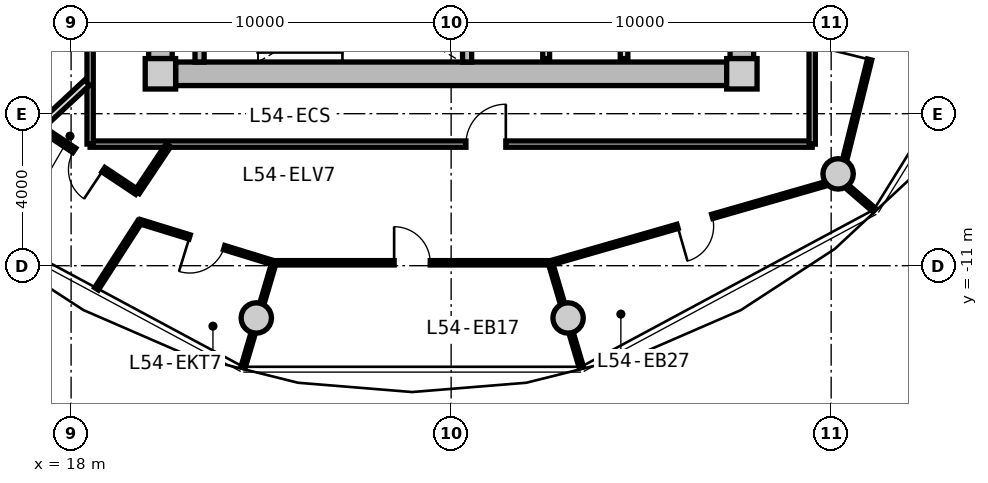
"""IFC4 building model, lengths in metres.
Left out: names, types, materials, properties, quantities, classifications, styles, units other than length and angle.
Written with IfcOpenShell. Run it as: python <this file> out.ifc"""

import sys

from ifc_helpers import new_model, si_unit, direction, frame, frame_2d, origin, origin_2d, place, context, subcontext, project, spatial, rectangle, circle, extrude, source, transform, mapped, element, fill, save


model = new_model("IFC4")
c1 = context("Model", 3, precision=1e-05, world=origin(), true_north=direction((0.0, 1.0)))
c2 = subcontext(c1, "Body", "Model", "MODEL_VIEW")
j1 = project(units=[si_unit("LENGTHUNIT", "METRE"), si_unit("PLANEANGLEUNIT", "RADIAN")], contexts=[c1])
p1 = place(None, origin())
s1 = spatial("IfcSite", under=j1, at=p1, CompositionType="ELEMENT")
p2 = place(p1, origin())
s2 = spatial("IfcBuilding", under=s1, at=p2, CompositionType="ELEMENT")
p3 = place(p2, frame((0.0, 0.0, 173.95)))
s3 = spatial("IfcBuildingStorey", under=s2, at=p3, CompositionType="ELEMENT", Elevation=173.95)
m1 = source(origin(), c2, "Body", "SweptSolid", [
    extrude(rectangle(XDim=0.8, YDim=0.8, at=origin_2d()), origin(), (0.0, 0.0, 1.0), 3.05),
])
for number, where, z_axis, x_axis in (
    (1, (20.35, -5.95, 0.0), (0.0, 0.0, 1.0), (1.0, 0.0, 0.0)),
    (2, (35.65, -5.95, 0.0), (0.0, 0.0, 1.0), (1.0, 0.0, 0.0)),
):
    element("IfcColumn", number, at=place(p3, frame(where, z_axis=z_axis, x_axis=x_axis)), inside=s3, PredefinedType="COLUMN", context=c2, shape_type="MappedRepresentation", body=[
        mapped(m1, transform((0.0, 0.0, 0.0), x_axis=(1.0, 0.0, 0.0), y_axis=(0.0, 1.0, 0.0), z_axis=(0.0, 0.0, 1.0), scale=1.0)),
    ])
m2 = source(origin(), c2, "Body", "SweptSolid", [
    extrude(rectangle(XDim=14.5, YDim=0.62, at=frame_2d((7.25, 0.0))), origin(), (0.0, 0.0, 1.0), 2.81),
])
p4 = place(p3, frame((35.25, -5.95, 0.0), z_axis=(0.0, 0.0, 1.0), x_axis=(-1.0, 0.0, 0.0)))
e3 = element("IfcWall", 3, at=p4, inside=s3, PredefinedType="SHEAR", context=c2, shape_type="MappedRepresentation", body=[
    mapped(m2, transform((0.0, 0.0, 0.0), x_axis=(1.0, 0.0, 0.0), y_axis=(0.0, 1.0, 0.0), z_axis=(0.0, 0.0, 1.0), scale=1.0)),
])
m3 = source(origin(), c2, "Body", "SweptSolid", [
    extrude(rectangle(XDim=11.1, YDim=0.62, at=frame_2d((5.55, 0.0))), origin(), (0.0, 0.0, 1.0), 2.81),
])
p5 = place(p3, frame((20.35, -5.55, 0.0), z_axis=(0.0, 0.0, 1.0), x_axis=(0.0, 1.0, 0.0)))
e4 = element("IfcWall", 4, at=p5, inside=s3, PredefinedType="SHEAR", context=c2, shape_type="MappedRepresentation", body=[
    mapped(m3, transform((0.0, 0.0, 0.0), x_axis=(1.0, 0.0, 0.0), y_axis=(0.0, 1.0, 0.0), z_axis=(0.0, 0.0, 1.0), scale=1.0)),
])
p6 = place(p5, frame((3.8, 0.0, 0.0)))
e5 = element("IfcOpeningElement", 5, at=p6, cuts=e4, PredefinedType="OPENING", context=c2, shape_type="SweptSolid", body=[
    extrude(rectangle(XDim=1.2, YDim=2.15, at=frame_2d((0.6, 1.075))), frame((0.0, 0.32, 0.0), z_axis=(0.0, -1.0, 0.0), x_axis=(1.0, 0.0, 0.0)), (0.0, 0.0, 1.0), 0.64),
])
p7 = place(p3, frame((35.65, 5.55, 0.0), z_axis=(0.0, 0.0, 1.0), x_axis=(0.0, -1.0, 0.0)))
e6 = element("IfcWall", 6, at=p7, inside=s3, PredefinedType="SHEAR", context=c2, shape_type="MappedRepresentation", body=[
    mapped(m3, transform((0.0, 0.0, 0.0), x_axis=(1.0, 0.0, 0.0), y_axis=(0.0, 1.0, 0.0), z_axis=(0.0, 0.0, 1.0), scale=1.0)),
])
p8 = place(p7, frame((5.65, 0.0, 0.0)))
e7 = element("IfcOpeningElement", 7, at=p8, cuts=e6, PredefinedType="OPENING", context=c2, shape_type="SweptSolid", body=[
    extrude(rectangle(XDim=1.2, YDim=2.15, at=frame_2d((0.6, 1.075))), frame((0.0, 0.32, 0.0), z_axis=(0.0, -1.0, 0.0), x_axis=(1.0, 0.0, 0.0)), (0.0, 0.0, 1.0), 0.64),
])
m4 = source(origin(), c2, "Body", "SweptSolid", [
    extrude(circle(Radius=0.4, at=origin_2d()), origin(), (0.0, 0.0, 1.0), 3.05),
])
for number, where, z_axis, x_axis in (
    (8, (22.873, -12.375, 0.0), (0.0, 0.0, 1.0), (1.0, 0.0, 0.0)),
    (9, (31.077, -12.375, 0.0), (0.0, 0.0, 1.0), (1.0, 0.0, 0.0)),
    (10, (38.183, -8.584, 0.0), (0.0, 0.0, 1.0), (1.0, 0.0, 0.0)),
):
    element("IfcColumn", number, at=place(p3, frame(where, z_axis=z_axis, x_axis=x_axis)), inside=s3, PredefinedType="COLUMN", context=c2, shape_type="MappedRepresentation", body=[
        mapped(m4, transform((0.0, 0.0, 0.0), x_axis=(1.0, 0.0, 0.0), y_axis=(0.0, 1.0, 0.0), z_axis=(0.0, 0.0, 1.0), scale=1.0)),
    ])
m5 = source(origin(), c2, "Body", "SweptSolid", [
    extrude(rectangle(XDim=3.19, YDim=0.24, at=frame_2d((1.595, 0.0))), origin(), (0.0, 0.0, 1.0), 2.81),
])
for number, where, z_axis, x_axis in (
    (11, (21.38, -5.64, 0.0), (0.0, 0.0, 1.0), (0.0, 1.0, 0.0)),
    (12, (28.42, -5.64, 0.0), (0.0, 0.0, 1.0), (0.0, 1.0, 0.0)),
):
    element("IfcWall", number, at=place(p3, frame(where, z_axis=z_axis, x_axis=x_axis)), inside=s3, PredefinedType="PARTITIONING", context=c2, shape_type="MappedRepresentation", body=[
        mapped(m5, transform((0.0, 0.0, 0.0), x_axis=(1.0, 0.0, 0.0), y_axis=(0.0, 1.0, 0.0), z_axis=(0.0, 0.0, 1.0), scale=1.0)),
    ])
m6 = source(origin(), c2, "Body", "SweptSolid", [
    extrude(rectangle(XDim=3.8, YDim=0.2, at=frame_2d((1.9, 0.0))), origin(), (0.0, 0.0, 1.0), 2.795),
])
p9 = place(p3, frame((32.55, -5.55, 0.0), z_axis=(0.0, 0.0, 1.0), x_axis=(0.0, 1.0, 0.0)))
e13 = element("IfcWall", 13, at=p9, inside=s3, PredefinedType="PARTITIONING", context=c2, shape_type="MappedRepresentation", body=[
    mapped(m6, transform((0.0, 0.0, 0.0), x_axis=(1.0, 0.0, 0.0), y_axis=(0.0, 1.0, 0.0), z_axis=(0.0, 0.0, 1.0), scale=1.0)),
])
m7 = source(origin(), c2, "Body", "SweptSolid", [
    extrude(rectangle(XDim=4.2, YDim=0.18, at=frame_2d((2.1, 0.0))), origin(), (0.0, 0.0, 1.0), 2.795),
])
p10 = place(p3, frame((30.5, -5.55, 0.0), z_axis=(0.0, 0.0, 1.0), x_axis=(0.0, 1.0, 0.0)))
e14 = element("IfcWall", 14, at=p10, inside=s3, PredefinedType="PARTITIONING", context=c2, shape_type="MappedRepresentation", body=[
    mapped(m7, transform((0.0, 0.0, 0.0), x_axis=(1.0, 0.0, 0.0), y_axis=(0.0, 1.0, 0.0), z_axis=(0.0, 0.0, 1.0), scale=1.0)),
])
m8 = source(origin(), c2, "Body", "SweptSolid", [
    extrude(rectangle(XDim=19.0, YDim=0.165, at=frame_2d((9.5, 0.0))), origin(), (0.0, 0.0, 1.0), 2.795),
])
p11 = place(p3, frame((37.5, -7.8, 0.0), z_axis=(0.0, 0.0, 1.0), x_axis=(-1.0, 0.0, 0.0)))
e15 = element("IfcWall", 15, at=p11, inside=s3, PredefinedType="PARTITIONING", context=c2, shape_type="MappedRepresentation", body=[
    mapped(m8, transform((0.0, 0.0, 0.0), x_axis=(1.0, 0.0, 0.0), y_axis=(0.0, 1.0, 0.0), z_axis=(0.0, 0.0, 1.0), scale=1.0)),
])
p12 = place(p11, frame((8.061, 0.0, 0.0)))
e16 = element("IfcOpeningElement", 16, at=p12, cuts=e15, PredefinedType="OPENING", context=c2, shape_type="SweptSolid", body=[
    extrude(rectangle(XDim=1.05, YDim=2.15, at=frame_2d((0.525, 1.075))), frame((0.0, 0.093, 0.0), z_axis=(0.0, -1.0, 0.0), x_axis=(1.0, 0.0, 0.0)), (0.0, 0.0, 1.0), 0.185),
])
m9 = source(origin(), c2, "Body", "SweptSolid", [
    extrude(rectangle(XDim=7.365, YDim=0.165, at=frame_2d((3.682, 0.0))), origin(), (0.0, 0.0, 1.0), 2.795),
])
p13 = place(p3, frame((18.5, -7.8, 0.0), z_axis=(0.0, 0.0, 1.0), x_axis=(0.0, 1.0, 0.0)))
e17 = element("IfcWall", 17, at=p13, inside=s3, PredefinedType="PARTITIONING", context=c2, shape_type="MappedRepresentation", body=[
    mapped(m9, transform((0.0, 0.0, 0.0), x_axis=(1.0, 0.0, 0.0), y_axis=(0.0, 1.0, 0.0), z_axis=(0.0, 0.0, 1.0), scale=1.0)),
])
p14 = place(p13, frame((2.854, 0.0, 0.0)))
e18 = element("IfcOpeningElement", 18, at=p14, cuts=e17, PredefinedType="OPENING", context=c2, shape_type="SweptSolid", body=[
    extrude(rectangle(XDim=1.05, YDim=2.15, at=frame_2d((0.525, 1.075))), frame((0.0, 0.093, 0.0), z_axis=(0.0, -1.0, 0.0), x_axis=(1.0, 0.0, 0.0)), (0.0, 0.0, 1.0), 0.185),
])
m10 = source(origin(), c2, "Body", "SweptSolid", [
    extrude(rectangle(XDim=6.88, YDim=0.165, at=frame_2d((3.44, 0.0))), origin(), (0.0, 0.0, 1.0), 2.795),
])
p15 = place(p3, frame((37.5, -0.92, 0.0), z_axis=(0.0, 0.0, 1.0), x_axis=(0.0, -1.0, 0.0)))
e19 = element("IfcWall", 19, at=p15, inside=s3, PredefinedType="PARTITIONING", context=c2, shape_type="MappedRepresentation", body=[
    mapped(m10, transform((0.0, 0.0, 0.0), x_axis=(1.0, 0.0, 0.0), y_axis=(0.0, 1.0, 0.0), z_axis=(0.0, 0.0, 1.0), scale=1.0)),
])
m11 = source(origin(), c2, "Body", "SweptSolid", [
    extrude(rectangle(XDim=4.927, YDim=0.19, at=frame_2d((2.463, 0.0))), origin(), (0.0, 0.0, 1.0), 2.345),
])
p16 = place(p3, frame((18.42, -6.183, 0.0), z_axis=(0.0, 0.0, 1.0), x_axis=(-0.732191335987, -0.681098999783, 0.0)))
e20 = element("IfcWall", 20, at=p16, inside=s3, PredefinedType="PARTITIONING", context=c2, shape_type="MappedRepresentation", body=[
    mapped(m11, transform((0.0, 0.0, 0.0), x_axis=(1.0, 0.0, 0.0), y_axis=(0.0, 1.0, 0.0), z_axis=(0.0, 0.0, 1.0), scale=1.0)),
])
m12 = source(origin(), c2, "Body", "SweptSolid", [
    extrude(rectangle(XDim=7.274, YDim=0.115, at=frame_2d((3.637, 0.0))), origin(), (0.0, 0.0, 1.0), 2.795),
])
p17 = place(p3, frame((23.338, -10.924, 0.0), z_axis=(0.0, 0.0, 1.0), x_axis=(1.0, 0.0, 0.0)))
e21 = element("IfcWall", 21, at=p17, inside=s3, PredefinedType="PARTITIONING", context=c2, shape_type="MappedRepresentation", body=[
    mapped(m12, transform((0.0, 0.0, 0.0), x_axis=(1.0, 0.0, 0.0), y_axis=(0.0, 1.0, 0.0), z_axis=(0.0, 0.0, 1.0), scale=1.0)),
])
p18 = place(p17, frame((3.162, 0.0, 0.0)))
e22 = element("IfcOpeningElement", 22, at=p18, cuts=e21, PredefinedType="OPENING", context=c2, shape_type="SweptSolid", body=[
    extrude(rectangle(XDim=0.95, YDim=2.1, at=frame_2d((0.475, 1.05))), frame((0.0, 0.067, 0.0), z_axis=(0.0, -1.0, 0.0), x_axis=(1.0, 0.0, 0.0)), (0.0, 0.0, 1.0), 0.135),
])
m13 = source(origin(), c2, "Body", "SweptSolid", [
    extrude(rectangle(XDim=2.874, YDim=0.115, at=frame_2d((1.437, 0.0))), origin(), (0.0, 0.0, 1.0), 2.345),
])
p19 = place(p3, frame((23.338, -10.924, 0.0), z_axis=(0.0, 0.0, 1.0), x_axis=(-0.283573427988, -0.958950525804, 0.0)))
e23 = element("IfcWall", 23, at=p19, inside=s3, PredefinedType="PARTITIONING", context=c2, shape_type="MappedRepresentation", body=[
    mapped(m13, transform((0.0, 0.0, 0.0), x_axis=(1.0, 0.0, 0.0), y_axis=(0.0, 1.0, 0.0), z_axis=(0.0, 0.0, 1.0), scale=1.0)),
])
m14 = source(origin(), c2, "Body", "SweptSolid", [
    extrude(rectangle(XDim=7.911, YDim=0.115, at=frame_2d((3.955, 0.0))), origin(), (0.0, 0.0, 1.0), 2.345),
])
p20 = place(p3, frame((30.613, -10.927, 0.0), z_axis=(0.0, 0.0, 1.0), x_axis=(0.961104741235, 0.276184134908, 0.0)))
e24 = element("IfcWall", 24, at=p20, inside=s3, PredefinedType="PARTITIONING", context=c2, shape_type="MappedRepresentation", body=[
    mapped(m14, transform((0.0, 0.0, 0.0), x_axis=(1.0, 0.0, 0.0), y_axis=(0.0, 1.0, 0.0), z_axis=(0.0, 0.0, 1.0), scale=1.0)),
])
p21 = place(p20, frame((3.48, 0.0, 0.0)))
e25 = element("IfcOpeningElement", 25, at=p21, cuts=e24, PredefinedType="OPENING", context=c2, shape_type="SweptSolid", body=[
    extrude(rectangle(XDim=0.95, YDim=2.1, at=frame_2d((0.475, 1.05))), frame((0.0, 0.067, 0.0), z_axis=(0.0, -1.0, 0.0), x_axis=(1.0, 0.0, 0.0)), (0.0, 0.0, 1.0), 0.135),
])
m15 = source(origin(), c2, "Body", "SweptSolid", [
    extrude(rectangle(XDim=2.871, YDim=0.115, at=frame_2d((1.436, 0.0))), origin(), (0.0, 0.0, 1.0), 2.345),
])
p22 = place(p3, frame((30.613, -10.927, 0.0), z_axis=(0.0, 0.0, 1.0), x_axis=(0.283616326168, -0.958937839242, 0.0)))
e26 = element("IfcWall", 26, at=p22, inside=s3, PredefinedType="PARTITIONING", context=c2, shape_type="MappedRepresentation", body=[
    mapped(m15, transform((0.0, 0.0, 0.0), x_axis=(1.0, 0.0, 0.0), y_axis=(0.0, 1.0, 0.0), z_axis=(0.0, 0.0, 1.0), scale=1.0)),
])
m16 = source(origin(), c2, "Body", "SweptSolid", [
    extrude(rectangle(XDim=7.492, YDim=0.115, at=frame_2d((3.746, 0.0))), origin(), (0.0, 0.0, 1.0), 2.345),
])
p23 = place(p3, frame((38.223, -8.749, 0.0), z_axis=(0.0, 0.0, 1.0), x_axis=(0.24104782819, 0.970513237686, 0.0)))
e27 = element("IfcWall", 27, at=p23, inside=s3, PredefinedType="PARTITIONING", context=c2, shape_type="MappedRepresentation", body=[
    mapped(m16, transform((0.0, 0.0, 0.0), x_axis=(1.0, 0.0, 0.0), y_axis=(0.0, 1.0, 0.0), z_axis=(0.0, 0.0, 1.0), scale=1.0)),
])
p24 = place(p23, frame((3.271, 0.0, 0.0)))
e28 = element("IfcOpeningElement", 28, at=p24, cuts=e27, PredefinedType="OPENING", context=c2, shape_type="SweptSolid", body=[
    extrude(rectangle(XDim=0.95, YDim=2.1, at=frame_2d((0.475, 1.05))), frame((0.0, 0.067, 0.0), z_axis=(0.0, -1.0, 0.0), x_axis=(1.0, 0.0, 0.0)), (0.0, 0.0, 1.0), 0.135),
])
m17 = source(origin(), c2, "Body", "SweptSolid", [
    extrude(rectangle(XDim=1.208, YDim=0.115, at=frame_2d((0.604, 0.0))), origin(), (0.0, 0.0, 1.0), 2.795),
])
p25 = place(p3, frame((38.223, -8.749, 0.0), z_axis=(0.0, 0.0, 1.0), x_axis=(0.75668207681, -0.653783018008, 0.0)))
e29 = element("IfcWall", 29, at=p25, inside=s3, PredefinedType="PARTITIONING", context=c2, shape_type="MappedRepresentation", body=[
    mapped(m17, transform((0.0, 0.0, 0.0), x_axis=(1.0, 0.0, 0.0), y_axis=(0.0, 1.0, 0.0), z_axis=(0.0, 0.0, 1.0), scale=1.0)),
])
m18 = source(origin(), c2, "Body", "SweptSolid", [
    extrude(rectangle(XDim=1.482, YDim=0.14, at=frame_2d((0.741, 0.0))), origin(), (0.0, 0.0, 1.0), 2.795),
])
p26 = place(p3, frame((20.56, -7.83, 0.0), z_axis=(0.0, 0.0, 1.0), x_axis=(-0.555308105158, -0.831644700786, 0.0)))
e30 = element("IfcWall", 30, at=p26, inside=s3, PredefinedType="PARTITIONING", context=c2, shape_type="MappedRepresentation", body=[
    mapped(m18, transform((0.0, 0.0, 0.0), x_axis=(1.0, 0.0, 0.0), y_axis=(0.0, 1.0, 0.0), z_axis=(0.0, 0.0, 1.0), scale=1.0)),
])
m19 = source(origin(), c2, "Body", "SweptSolid", [
    extrude(rectangle(XDim=3.051, YDim=0.14, at=frame_2d((1.525, 0.0))), origin(), (0.0, 0.0, 1.0), 2.795),
])
p27 = place(p3, frame((19.737, -9.063, 0.0), z_axis=(0.0, 0.0, 1.0), x_axis=(-0.832763694299, 0.553628602456, 0.0)))
e31 = element("IfcWall", 31, at=p27, inside=s3, PredefinedType="PARTITIONING", context=c2, shape_type="MappedRepresentation", body=[
    mapped(m19, transform((0.0, 0.0, 0.0), x_axis=(1.0, 0.0, 0.0), y_axis=(0.0, 1.0, 0.0), z_axis=(0.0, 0.0, 1.0), scale=1.0)),
])
p28 = place(p27, frame((1.065, 0.0, 0.0)))
e32 = element("IfcOpeningElement", 32, at=p28, cuts=e31, PredefinedType="OPENING", context=c2, shape_type="SweptSolid", body=[
    extrude(rectangle(XDim=0.92, YDim=2.1, at=frame_2d((0.46, 1.05))), frame((0.0, 0.08, 0.0), z_axis=(0.0, -1.0, 0.0), x_axis=(1.0, 0.0, 0.0)), (0.0, 0.0, 1.0), 0.16),
])
m20 = source(origin(), c2, "Body", "SweptSolid", [
    extrude(rectangle(XDim=2.105, YDim=0.115, at=frame_2d((1.052, 0.0))), origin(), (0.0, 0.0, 1.0), 2.795),
])
p29 = place(p3, frame((19.808, -9.839, 0.0), z_axis=(0.0, 0.0, 1.0), x_axis=(-0.541542884204, -0.840673125875, 0.0)))
e33 = element("IfcWall", 33, at=p29, inside=s3, PredefinedType="PARTITIONING", context=c2, shape_type="MappedRepresentation", body=[
    mapped(m20, transform((0.0, 0.0, 0.0), x_axis=(1.0, 0.0, 0.0), y_axis=(0.0, 1.0, 0.0), z_axis=(0.0, 0.0, 1.0), scale=1.0)),
])
m21 = source(origin(), c2, "Body", "SweptSolid", [
    extrude(rectangle(XDim=3.693, YDim=0.115, at=frame_2d((1.847, 0.0))), origin(), (0.0, 0.0, 1.0), 2.795),
])
p30 = place(p3, frame((19.808, -9.839, 0.0), z_axis=(0.0, 0.0, 1.0), x_axis=(0.955691778506, -0.294369197599, 0.0)))
e34 = element("IfcWall", 34, at=p30, inside=s3, PredefinedType="PARTITIONING", context=c2, shape_type="MappedRepresentation", body=[
    mapped(m21, transform((0.0, 0.0, 0.0), x_axis=(1.0, 0.0, 0.0), y_axis=(0.0, 1.0, 0.0), z_axis=(0.0, 0.0, 1.0), scale=1.0)),
])
p31 = place(p30, frame((1.372, 0.0, 0.0)))
e35 = element("IfcOpeningElement", 35, at=p31, cuts=e34, PredefinedType="OPENING", context=c2, shape_type="SweptSolid", body=[
    extrude(rectangle(XDim=0.95, YDim=2.1, at=frame_2d((0.475, 1.05))), frame((0.0, 0.067, 0.0), z_axis=(0.0, -1.0, 0.0), x_axis=(1.0, 0.0, 0.0)), (0.0, 0.0, 1.0), 0.135),
])
m22 = source(origin(), c2, "Body", "SweptSolid", [
    extrude(rectangle(XDim=1.05, YDim=2.15, at=frame_2d((0.525, 1.075))), frame((0.0, 0.025, 0.0), z_axis=(0.0, -1.0, 0.0), x_axis=(1.0, 0.0, 0.0)), (0.0, 0.0, 1.0), 0.05),
])
p32 = place(p12, frame((1.05, 0.0, 0.0), z_axis=(0.0, 0.0, 1.0), x_axis=(-1.0, 0.0, 0.0)))
e36 = element("IfcDoor", 36, at=p32, inside=s3, OperationType="SINGLE_SWING_RIGHT", PredefinedType="DOOR", context=c2, shape_type="MappedRepresentation", body=[
    mapped(m22, transform((0.0, 0.0, 0.0), x_axis=(1.0, 0.0, 0.0), y_axis=(0.0, 1.0, 0.0), z_axis=(0.0, 0.0, 1.0), scale=1.0)),
])
fill(e16, e36)
m23 = source(origin(), c2, "Body", "SweptSolid", [
    extrude(rectangle(XDim=0.92, YDim=2.1, at=frame_2d((0.46, 1.05))), frame((0.0, 0.025, 0.0), z_axis=(0.0, -1.0, 0.0), x_axis=(1.0, 0.0, 0.0)), (0.0, 0.0, 1.0), 0.05),
])
p33 = place(p28, origin())
e37 = element("IfcDoor", 37, at=p33, inside=s3, OperationType="SINGLE_SWING_LEFT", PredefinedType="DOOR", context=c2, shape_type="MappedRepresentation", body=[
    mapped(m23, transform((0.0, 0.0, 0.0), x_axis=(1.0, 0.0, 0.0), y_axis=(0.0, 1.0, 0.0), z_axis=(0.0, 0.0, 1.0), scale=1.0)),
])
fill(e32, e37)
m24 = source(origin(), c2, "Body", "SweptSolid", [
    extrude(rectangle(XDim=0.95, YDim=2.1, at=frame_2d((0.475, 1.05))), frame((0.0, 0.025, 0.0), z_axis=(0.0, -1.0, 0.0), x_axis=(1.0, 0.0, 0.0)), (0.0, 0.0, 1.0), 0.05),
])
p34 = place(p31, frame((0.95, 0.0, 0.0), z_axis=(0.0, 0.0, 1.0), x_axis=(-1.0, 0.0, 0.0)))
e38 = element("IfcDoor", 38, at=p34, inside=s3, OperationType="SINGLE_SWING_RIGHT", PredefinedType="DOOR", context=c2, shape_type="MappedRepresentation", body=[
    mapped(m24, transform((0.0, 0.0, 0.0), x_axis=(1.0, 0.0, 0.0), y_axis=(0.0, 1.0, 0.0), z_axis=(0.0, 0.0, 1.0), scale=1.0)),
])
fill(e35, e38)
p35 = place(p18, origin())
e39 = element("IfcDoor", 39, at=p35, inside=s3, OperationType="SINGLE_SWING_LEFT", PredefinedType="DOOR", context=c2, shape_type="MappedRepresentation", body=[
    mapped(m24, transform((0.0, 0.0, 0.0), x_axis=(1.0, 0.0, 0.0), y_axis=(0.0, 1.0, 0.0), z_axis=(0.0, 0.0, 1.0), scale=1.0)),
])
fill(e22, e39)
p36 = place(p21, frame((0.95, 0.0, 0.0), z_axis=(0.0, 0.0, 1.0), x_axis=(-1.0, 0.0, 0.0)))
e40 = element("IfcDoor", 40, at=p36, inside=s3, OperationType="SINGLE_SWING_RIGHT", PredefinedType="DOOR", context=c2, shape_type="MappedRepresentation", body=[
    mapped(m24, transform((0.0, 0.0, 0.0), x_axis=(1.0, 0.0, 0.0), y_axis=(0.0, 1.0, 0.0), z_axis=(0.0, 0.0, 1.0), scale=1.0)),
])
fill(e25, e40)
p37 = place(p24, origin())
e41 = element("IfcDoor", 41, at=p37, inside=s3, OperationType="SINGLE_SWING_LEFT", PredefinedType="DOOR", context=c2, shape_type="MappedRepresentation", body=[
    mapped(m24, transform((0.0, 0.0, 0.0), x_axis=(1.0, 0.0, 0.0), y_axis=(0.0, 1.0, 0.0), z_axis=(0.0, 0.0, 1.0), scale=1.0)),
])
fill(e28, e41)
save(model, sys.argv[1])
